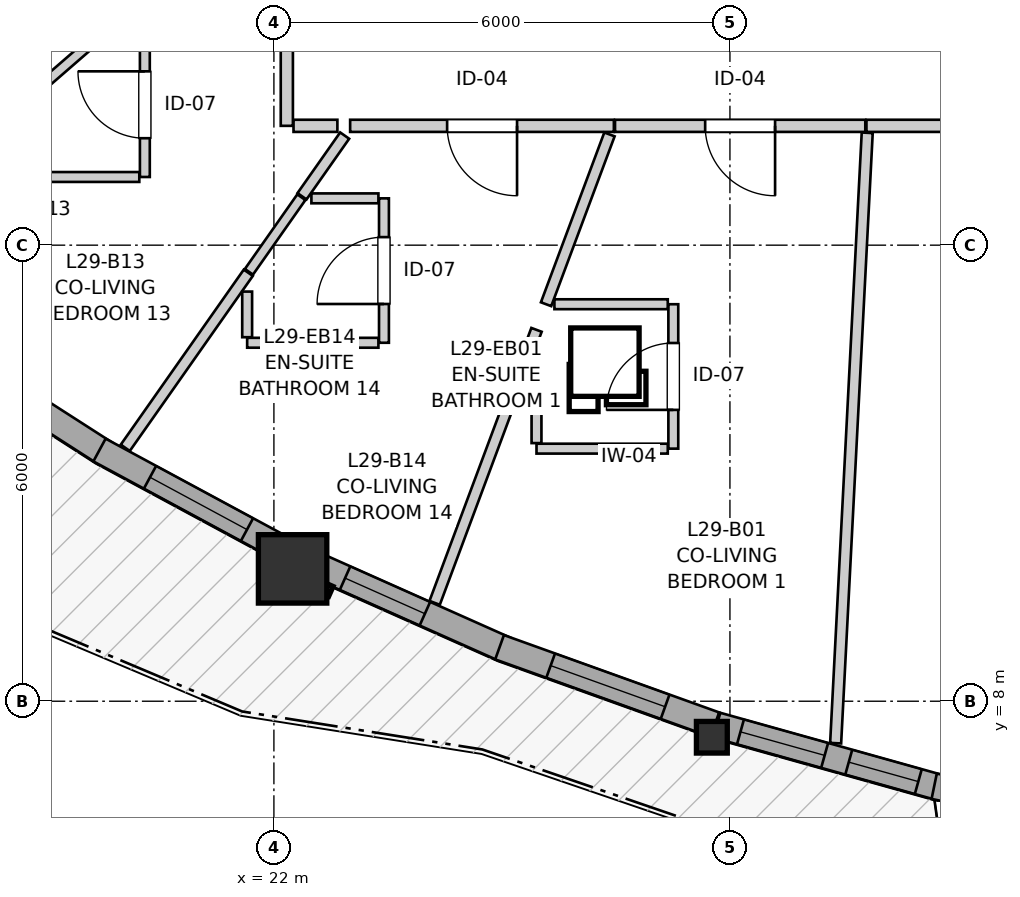
"""IFC4 building model, lengths in metres.
Left out: names, types, materials, properties, quantities, classifications, styles, units other than length and angle.
Written with IfcOpenShell. Run it as: python <this file> out.ifc"""

import sys

from ifc_helpers import new_model, si_unit, direction, frame, frame_2d, origin, origin_2d, place, context, subcontext, project, spatial, rectangle, i_section, extrude, source, transform, mapped, element, fill, save


model = new_model("IFC4")
c1 = context("Model", 3, precision=1e-05, world=origin(), true_north=direction((0.0, 1.0)))
c2 = subcontext(c1, "Body", "Model", "MODEL_VIEW")
j1 = project(units=[si_unit("LENGTHUNIT", "METRE"), si_unit("PLANEANGLEUNIT", "RADIAN")], contexts=[c1])
p1 = place(None, origin())
s1 = spatial("IfcSite", under=j1, at=p1, CompositionType="ELEMENT")
p2 = place(p1, origin())
s2 = spatial("IfcBuilding", under=s1, at=p2, CompositionType="ELEMENT")
p3 = place(p2, frame((0.0, 0.0, 99.2)))
s3 = spatial("IfcBuildingStorey", under=s2, at=p3, CompositionType="ELEMENT", Elevation=99.2)
m1 = source(origin(), c2, "Body", "SweptSolid", [
    extrude(rectangle(XDim=0.9, YDim=0.9, at=origin_2d()), origin(), (0.0, 0.0, 1.0), 2.95),
])
p4 = place(p3, frame((22.246, 9.741, 0.0), z_axis=(0.0, 0.0, 1.0), x_axis=(1.0, 0.0, 0.0)))
e1 = element("IfcColumn", 1, at=p4, inside=s3, PredefinedType="COLUMN", context=c2, shape_type="MappedRepresentation", body=[
    mapped(m1, transform((0.0, 0.0, 0.0), x_axis=(1.0, 0.0, 0.0), y_axis=(0.0, 1.0, 0.0), z_axis=(0.0, 0.0, 1.0), scale=1.0)),
])
m2 = source(origin(), c2, "Body", "SweptSolid", [
    extrude(i_section(OverallWidth=0.406, OverallDepth=0.416, WebThickness=0.027, FlangeThickness=0.044, FilletRadius=0.015, at=origin_2d()), origin(), (0.0, 0.0, 1.0), 2.95),
])
p5 = place(p3, frame((27.762, 7.526, 0.0), z_axis=(0.0, 0.0, 1.0), x_axis=(1.0, 0.0, 0.0)))
e2 = element("IfcColumn", 2, at=p5, inside=s3, PredefinedType="PILASTER", context=c2, shape_type="MappedRepresentation", body=[
    mapped(m2, transform((0.0, 0.0, 0.0), x_axis=(1.0, 0.0, 0.0), y_axis=(0.0, 1.0, 0.0), z_axis=(0.0, 0.0, 1.0), scale=1.0)),
])
p6 = place(p3, frame((17.292, 12.858, 0.0), z_axis=(0.0, 0.0, 1.0), x_axis=(0.841524200167, -0.540219418878, 0.0)))
e3 = element("IfcWall", 3, at=p6, inside=s3, PredefinedType="SOLIDWALL", context=c2, shape_type="SweptSolid", body=[
    extrude(rectangle(XDim=2.958, YDim=0.34, at=frame_2d((1.479, 0.0))), origin(), (0.0, 0.0, 1.0), 2.48),
])
p7 = place(p6, frame((0.944, 0.0, 0.82)))
e4 = element("IfcOpeningElement", 4, at=p7, cuts=e3, PredefinedType="OPENING", context=c2, shape_type="SweptSolid", body=[
    extrude(rectangle(XDim=1.05, YDim=1.45, at=frame_2d((0.525, 0.725))), frame((0.0, 0.18, 0.0), z_axis=(0.0, -1.0, 0.0), x_axis=(1.0, 0.0, 0.0)), (0.0, 0.0, 1.0), 0.36),
])
p8 = place(p3, frame((19.705, 11.305, 0.0), z_axis=(0.0, 0.0, 1.0), x_axis=(0.880065774925, -0.474851799834, 0.0)))
e5 = element("IfcWall", 5, at=p8, inside=s3, PredefinedType="SOLIDWALL", context=c2, shape_type="SweptSolid", body=[
    extrude(rectangle(XDim=2.749, YDim=0.34, at=frame_2d((1.374, 0.0))), origin(), (0.0, 0.0, 1.0), 2.48),
])
p9 = place(p8, frame((0.755, 0.0, 0.82)))
e6 = element("IfcOpeningElement", 6, at=p9, cuts=e5, PredefinedType="OPENING", context=c2, shape_type="SweptSolid", body=[
    extrude(rectangle(XDim=1.45, YDim=1.25, at=frame_2d((0.725, 0.625))), frame((0.0, 0.18, 0.0), z_axis=(0.0, -1.0, 0.0), x_axis=(1.0, 0.0, 0.0)), (0.0, 0.0, 1.0), 0.36),
])
p10 = place(p3, frame((22.525, 9.803, 0.0), z_axis=(0.0, 0.0, 1.0), x_axis=(0.913407022137, -0.407047432016, 0.0)))
e7 = element("IfcWall", 7, at=p10, inside=s3, PredefinedType="SOLIDWALL", context=c2, shape_type="SweptSolid", body=[
    extrude(rectangle(XDim=2.766, YDim=0.34, at=frame_2d((1.383, 0.0))), origin(), (0.0, 0.0, 1.0), 2.48),
])
p11 = place(p10, frame((0.45, 0.0, 0.82)))
e8 = element("IfcOpeningElement", 8, at=p11, cuts=e7, PredefinedType="OPENING", context=c2, shape_type="SweptSolid", body=[
    extrude(rectangle(XDim=1.15, YDim=1.2, at=frame_2d((0.575, 0.6))), frame((0.0, 0.18, 0.0), z_axis=(0.0, -1.0, 0.0), x_axis=(1.0, 0.0, 0.0)), (0.0, 0.0, 1.0), 0.36),
])
p12 = place(p3, frame((24.969, 8.71, 0.0), z_axis=(0.0, 0.0, 1.0), x_axis=(0.94111062187, -0.338098798287, 0.0)))
e9 = element("IfcWall", 9, at=p12, inside=s3, PredefinedType="SOLIDWALL", context=c2, shape_type="SweptSolid", body=[
    extrude(rectangle(XDim=3.009, YDim=0.34, at=frame_2d((1.504, 0.0))), origin(), (0.0, 0.0, 1.0), 2.48),
])
p13 = place(p12, frame((0.714, 0.0, 0.82)))
e10 = element("IfcOpeningElement", 10, at=p13, cuts=e9, PredefinedType="OPENING", context=c2, shape_type="SweptSolid", body=[
    extrude(rectangle(XDim=1.6, YDim=1.35, at=frame_2d((0.8, 0.675))), frame((0.0, 0.18, 0.0), z_axis=(0.0, -1.0, 0.0), x_axis=(1.0, 0.0, 0.0)), (0.0, 0.0, 1.0), 0.36),
])
p14 = place(p3, frame((27.827, 7.684, 0.0), z_axis=(0.0, 0.0, 1.0), x_axis=(0.963051015651, -0.269319032475, 0.0)))
e11 = element("IfcWall", 11, at=p14, inside=s3, PredefinedType="SOLIDWALL", context=c2, shape_type="SweptSolid", body=[
    extrude(rectangle(XDim=3.059, YDim=0.34, at=frame_2d((1.529, 0.0))), origin(), (0.0, 0.0, 1.0), 2.48),
])
p15 = place(p14, frame((0.323, 0.0, 0.82)))
e12 = element("IfcOpeningElement", 12, at=p15, cuts=e11, PredefinedType="OPENING", context=c2, shape_type="SweptSolid", body=[
    extrude(rectangle(XDim=1.15, YDim=1.2, at=frame_2d((0.575, 0.6))), frame((0.0, 0.18, 0.0), z_axis=(0.0, -1.0, 0.0), x_axis=(1.0, 0.0, 0.0)), (0.0, 0.0, 1.0), 0.36),
])
p16 = place(p14, frame((1.803, 0.0, 0.82)))
e13 = element("IfcOpeningElement", 13, at=p16, cuts=e11, PredefinedType="OPENING", context=c2, shape_type="SweptSolid", body=[
    extrude(rectangle(XDim=0.95, YDim=1.35, at=frame_2d((0.475, 0.675))), frame((0.0, 0.18, 0.0), z_axis=(0.0, -1.0, 0.0), x_axis=(1.0, 0.0, 0.0)), (0.0, 0.0, 1.0), 0.36),
])
p17 = place(p3, frame((30.687, 6.881, 0.0), z_axis=(0.0, 0.0, 1.0), x_axis=(0.979429773913, -0.201785326453, 0.0)))
e14 = element("IfcWall", 14, at=p17, inside=s3, PredefinedType="SOLIDWALL", context=c2, shape_type="SweptSolid", body=[
    extrude(rectangle(XDim=2.913, YDim=0.34, at=frame_2d((1.457, 0.0))), origin(), (0.0, 0.0, 1.0), 2.48),
])
p18 = place(p17, frame((0.837, 0.0, 0.82)))
e15 = element("IfcOpeningElement", 15, at=p18, cuts=e14, PredefinedType="OPENING", context=c2, shape_type="SweptSolid", body=[
    extrude(rectangle(XDim=1.25, YDim=1.35, at=frame_2d((0.625, 0.675))), frame((0.0, 0.18, 0.0), z_axis=(0.0, -1.0, 0.0), x_axis=(1.0, 0.0, 0.0)), (0.0, 0.0, 1.0), 0.36),
])
p19 = place(p3, frame((34.373, 15.57, 0.0), z_axis=(0.0, 0.0, 1.0), x_axis=(-1.0, 0.0, 0.0)))
e16 = element("IfcWall", 16, at=p19, inside=s3, PredefinedType="PARTITIONING", context=c2, shape_type="SweptSolid", body=[
    extrude(rectangle(XDim=4.577, YDim=0.16, at=frame_2d((2.289, 0.0))), origin(), (0.0, 0.0, 1.0), 2.95),
])
p20 = place(p19, frame((1.639, 0.0, 0.0)))
e17 = element("IfcOpeningElement", 17, at=p20, cuts=e16, PredefinedType="OPENING", context=c2, shape_type="SweptSolid", body=[
    extrude(rectangle(XDim=1.3, YDim=2.1, at=frame_2d((0.65, 1.05))), frame((0.0, 0.09, 0.0), z_axis=(0.0, -1.0, 0.0), x_axis=(1.0, 0.0, 0.0)), (0.0, 0.0, 1.0), 0.18),
])
p21 = place(p3, frame((26.473, 15.57, 0.0), z_axis=(0.0, 0.0, 1.0), x_axis=(-1.0, 0.0, 0.0)))
e18 = element("IfcWall", 18, at=p21, inside=s3, PredefinedType="PARTITIONING", context=c2, shape_type="SweptSolid", body=[
    extrude(rectangle(XDim=3.47, YDim=0.16, at=frame_2d((1.735, 0.0))), origin(), (0.0, 0.0, 1.0), 2.95),
])
p22 = place(p21, frame((1.274, 0.0, 0.0)))
e19 = element("IfcOpeningElement", 19, at=p22, cuts=e18, PredefinedType="OPENING", context=c2, shape_type="SweptSolid", body=[
    extrude(rectangle(XDim=0.92, YDim=2.1, at=frame_2d((0.46, 1.05))), frame((0.0, 0.09, 0.0), z_axis=(0.0, -1.0, 0.0), x_axis=(1.0, 0.0, 0.0)), (0.0, 0.0, 1.0), 0.18),
])
p23 = place(p3, frame((22.17, 15.57, 0.0), z_axis=(0.0, 0.0, 1.0), x_axis=(0.0, 1.0, 0.0)))
e20 = element("IfcWall", 20, at=p23, inside=s3, PredefinedType="PARTITIONING", context=c2, shape_type="SweptSolid", body=[
    extrude(rectangle(XDim=3.346, YDim=0.16, at=frame_2d((1.673, 0.0))), origin(), (0.0, 0.0, 1.0), 2.95),
])
p24 = place(p23, frame((1.203, 0.0, 0.0)))
e21 = element("IfcOpeningElement", 21, at=p24, cuts=e20, PredefinedType="OPENING", context=c2, shape_type="SweptSolid", body=[
    extrude(rectangle(XDim=0.92, YDim=2.1, at=frame_2d((0.46, 1.05))), frame((0.0, 0.09, 0.0), z_axis=(0.0, -1.0, 0.0), x_axis=(1.0, 0.0, 0.0)), (0.0, 0.0, 1.0), 0.18),
])
p25 = place(p3, frame((29.781, 15.57, 0.0), z_axis=(0.0, 0.0, 1.0), x_axis=(-1.0, 0.0, 0.0)))
e22 = element("IfcWall", 22, at=p25, inside=s3, PredefinedType="PARTITIONING", context=c2, shape_type="SweptSolid", body=[
    extrude(rectangle(XDim=3.293, YDim=0.16, at=frame_2d((1.646, 0.0))), origin(), (0.0, 0.0, 1.0), 2.95),
])
p26 = place(p25, frame((1.187, 0.0, 0.0)))
e23 = element("IfcOpeningElement", 23, at=p26, cuts=e22, PredefinedType="OPENING", context=c2, shape_type="SweptSolid", body=[
    extrude(rectangle(XDim=0.92, YDim=2.1, at=frame_2d((0.46, 1.05))), frame((0.0, 0.09, 0.0), z_axis=(0.0, -1.0, 0.0), x_axis=(1.0, 0.0, 0.0)), (0.0, 0.0, 1.0), 0.18),
])
p27 = place(p3, frame((27.255, 11.323, 0.0), z_axis=(0.0, 0.0, 1.0), x_axis=(0.0, 1.0, 0.0)))
e24 = element("IfcWall", 24, at=p27, inside=s3, PredefinedType="PARTITIONING", context=c2, shape_type="SweptSolid", body=[
    extrude(rectangle(XDim=1.9, YDim=0.13, at=frame_2d((0.95, 0.0))), origin(), (0.0, 0.0, 1.0), 2.95),
])
p28 = place(p27, frame((0.51, 0.0, 0.0)))
e25 = element("IfcOpeningElement", 25, at=p28, cuts=e24, PredefinedType="OPENING", context=c2, shape_type="SweptSolid", body=[
    extrude(rectangle(XDim=0.88, YDim=2.05, at=frame_2d((0.44, 1.025))), frame((0.0, 0.075, 0.0), z_axis=(0.0, -1.0, 0.0), x_axis=(1.0, 0.0, 0.0)), (0.0, 0.0, 1.0), 0.15),
])
p29 = place(p3, frame((20.302, 14.897, 0.0), z_axis=(0.0, 0.0, 1.0), x_axis=(0.0, 1.0, 0.0)))
e26 = element("IfcWall", 26, at=p29, inside=s3, PredefinedType="PARTITIONING", context=c2, shape_type="SweptSolid", body=[
    extrude(rectangle(XDim=1.9, YDim=0.13, at=frame_2d((0.95, 0.0))), origin(), (0.0, 0.0, 1.0), 2.95),
])
p30 = place(p29, frame((0.51, 0.0, 0.0)))
e27 = element("IfcOpeningElement", 27, at=p30, cuts=e26, PredefinedType="OPENING", context=c2, shape_type="SweptSolid", body=[
    extrude(rectangle(XDim=0.88, YDim=2.05, at=frame_2d((0.44, 1.025))), frame((0.0, 0.075, 0.0), z_axis=(0.0, -1.0, 0.0), x_axis=(1.0, 0.0, 0.0)), (0.0, 0.0, 1.0), 0.15),
])
p31 = place(p3, frame((23.448, 12.716, 0.0), z_axis=(0.0, 0.0, 1.0), x_axis=(0.0, 1.0, 0.0)))
e28 = element("IfcWall", 28, at=p31, inside=s3, PredefinedType="PARTITIONING", context=c2, shape_type="SweptSolid", body=[
    extrude(rectangle(XDim=1.9, YDim=0.13, at=frame_2d((0.95, 0.0))), origin(), (0.0, 0.0, 1.0), 2.95),
])
p32 = place(p31, frame((0.51, 0.0, 0.0)))
e29 = element("IfcOpeningElement", 29, at=p32, cuts=e28, PredefinedType="OPENING", context=c2, shape_type="SweptSolid", body=[
    extrude(rectangle(XDim=0.88, YDim=2.05, at=frame_2d((0.44, 1.025))), frame((0.0, 0.075, 0.0), z_axis=(0.0, -1.0, 0.0), x_axis=(1.0, 0.0, 0.0)), (0.0, 0.0, 1.0), 0.15),
])
p33 = place(p3, frame((13.622, 16.028, 0.0), z_axis=(0.0, 0.0, 1.0), x_axis=(0.85896108151, 0.512040877716, 0.0)))
e30 = element("IfcWall", 30, at=p33, inside=s3, PredefinedType="PARTITIONING", context=c2, shape_type="SweptSolid", body=[
    extrude(rectangle(XDim=9.807, YDim=0.145, at=frame_2d((4.904, 0.0))), origin(), (0.0, 0.0, 1.0), 2.95),
])
p34 = place(p3, frame((29.391, 7.448, 0.0), z_axis=(0.0, 0.0, 1.0), x_axis=(0.051677535725, 0.998663823467, 0.0)))
e31 = element("IfcWall", 31, at=p34, inside=s3, PredefinedType="PARTITIONING", context=c2, shape_type="SweptSolid", body=[
    extrude(rectangle(XDim=8.041, YDim=0.145, at=frame_2d((4.021, 0.0))), origin(), (0.0, 0.0, 1.0), 2.95),
])
p35 = place(p3, frame((24.115, 9.294, 0.0), z_axis=(0.0, 0.0, 1.0), x_axis=(0.349559649022, 0.936914111205, 0.0)))
e32 = element("IfcWall", 32, at=p35, inside=s3, PredefinedType="PARTITIONING", context=c2, shape_type="SweptSolid", body=[
    extrude(rectangle(XDim=3.834, YDim=0.145, at=frame_2d((1.917, 0.0))), origin(), (0.0, 0.0, 1.0), 2.95),
])
p36 = place(p3, frame((20.044, 11.334, 0.0), z_axis=(0.0, 0.0, 1.0), x_axis=(0.575027113175, 0.818134352728, 0.0)))
e33 = element("IfcWall", 33, at=p36, inside=s3, PredefinedType="PARTITIONING", context=c2, shape_type="SweptSolid", body=[
    extrude(rectangle(XDim=2.815, YDim=0.145, at=frame_2d((1.407, 0.0))), origin(), (0.0, 0.0, 1.0), 2.95),
])
p37 = place(p3, frame((25.581, 13.223, 0.0), z_axis=(0.0, 0.0, 1.0), x_axis=(0.349597225683, 0.936900090615, 0.0)))
e34 = element("IfcWall", 34, at=p37, inside=s3, PredefinedType="PARTITIONING", context=c2, shape_type="SweptSolid", body=[
    extrude(rectangle(XDim=2.385, YDim=0.145, at=frame_2d((1.192, 0.0))), origin(), (0.0, 0.0, 1.0), 2.95),
])
p38 = place(p3, frame((25.455, 11.323, 0.0), z_axis=(0.0, 0.0, 1.0), x_axis=(1.0, 0.0, 0.0)))
e35 = element("IfcWall", 35, at=p38, inside=s3, PredefinedType="PARTITIONING", context=c2, shape_type="SweptSolid", body=[
    extrude(rectangle(XDim=1.727, YDim=0.13, at=frame_2d((0.863, 0.0))), origin(), (0.0, 0.0, 1.0), 2.558),
])
for number, where, z_axis, x_axis in (
    (36, (18.502, 14.897, 0.0), (0.0, 0.0, 1.0), (1.0, 0.0, 0.0)),
    (37, (21.648, 12.716, 0.0), (0.0, 0.0, 1.0), (1.0, 0.0, 0.0)),
):
    element("IfcWall", number, at=place(p3, frame(where, z_axis=z_axis, x_axis=x_axis)), inside=s3, PredefinedType="PARTITIONING", context=c2, shape_type="SweptSolid", body=[
        extrude(rectangle(XDim=1.727, YDim=0.13, at=frame_2d((0.864, 0.0))), origin(), (0.0, 0.0, 1.0), 2.95),
    ])
p39 = place(p3, frame((25.691, 13.223, 0.0), z_axis=(0.0, 0.0, 1.0), x_axis=(1.0, 0.0, 0.0)))
e38 = element("IfcWall", 38, at=p39, inside=s3, PredefinedType="PARTITIONING", context=c2, shape_type="SweptSolid", body=[
    extrude(rectangle(XDim=1.491, YDim=0.13, at=frame_2d((0.746, 0.0))), origin(), (0.0, 0.0, 1.0), 2.95),
])
p40 = place(p3, frame((18.528, 15.734, 0.0), z_axis=(0.0, 0.0, 1.0), x_axis=(0.755063236967, 0.655651971843, 0.0)))
e39 = element("IfcWall", 39, at=p40, inside=s3, PredefinedType="PARTITIONING", context=c2, shape_type="SweptSolid", body=[
    extrude(rectangle(XDim=1.584, YDim=0.13, at=frame_2d((0.792, 0.0))), origin(), (0.0, 0.0, 1.0), 2.95),
])
p41 = place(p3, frame((25.455, 11.396, 0.0), z_axis=(0.0, 0.0, 1.0), x_axis=(0.0, 1.0, 0.0)))
e40 = element("IfcWall", 40, at=p41, inside=s3, PredefinedType="PARTITIONING", context=c2, shape_type="SweptSolid", body=[
    extrude(rectangle(XDim=1.25, YDim=0.13, at=frame_2d((0.625, 0.0))), origin(), (0.0, 0.0, 1.0), 2.95),
])
p42 = place(p3, frame((21.671, 13.649, 0.0), z_axis=(0.0, 0.0, 1.0), x_axis=(0.574868196693, 0.81824602439, 0.0)))
e41 = element("IfcWall", 41, at=p42, inside=s3, PredefinedType="PARTITIONING", context=c2, shape_type="SweptSolid", body=[
    extrude(rectangle(XDim=1.2, YDim=0.13, at=frame_2d((0.6, 0.0))), origin(), (0.0, 0.0, 1.0), 2.95),
])
p43 = place(p3, frame((22.37, 14.643, 0.0), z_axis=(0.0, 0.0, 1.0), x_axis=(0.575022445487, 0.818137633401, 0.0)))
e42 = element("IfcWall", 42, at=p43, inside=s3, PredefinedType="PARTITIONING", context=c2, shape_type="SweptSolid", body=[
    extrude(rectangle(XDim=0.976, YDim=0.145, at=frame_2d((0.488, 0.0))), origin(), (0.0, 0.0, 1.0), 2.95),
])
p44 = place(p3, frame((22.493, 14.616, 0.0), z_axis=(0.0, 0.0, 1.0), x_axis=(1.0, 0.0, 0.0)))
e43 = element("IfcWall", 43, at=p44, inside=s3, PredefinedType="PARTITIONING", context=c2, shape_type="SweptSolid", body=[
    extrude(rectangle(XDim=0.882, YDim=0.13, at=frame_2d((0.441, 0.0))), origin(), (0.0, 0.0, 1.0), 2.95),
])
p45 = place(p3, frame((21.648, 12.789, 0.0), z_axis=(0.0, 0.0, 1.0), x_axis=(0.0, 1.0, 0.0)))
e44 = element("IfcWall", 44, at=p45, inside=s3, PredefinedType="PARTITIONING", context=c2, shape_type="SweptSolid", body=[
    extrude(rectangle(XDim=0.6, YDim=0.13, at=frame_2d((0.3, 0.0))), origin(), (0.0, 0.0, 1.0), 2.95),
])
p46 = place(p3, frame((22.258, 15.57, 0.0), z_axis=(0.0, 0.0, 1.0), x_axis=(1.0, 0.0, 0.0)))
e45 = element("IfcWall", 45, at=p46, inside=s3, PredefinedType="PARTITIONING", context=c2, shape_type="SweptSolid", body=[
    extrude(rectangle(XDim=0.577, YDim=0.16, at=frame_2d((0.289, 0.0))), origin(), (0.0, 0.0, 1.0), 2.95),
])
m3 = source(origin(), c2, "Body", "SweptSolid", [
    extrude(rectangle(XDim=1.45, YDim=1.25, at=frame_2d((0.725, 0.625))), frame((0.0, 0.03, 0.0), z_axis=(0.0, -1.0, 0.0), x_axis=(1.0, 0.0, 0.0)), (0.0, 0.0, 1.0), 0.06),
])
p47 = place(p9, origin())
e46 = element("IfcWindow", 46, at=p47, inside=s3, PartitioningType="SINGLE_PANEL", PredefinedType="WINDOW", context=c2, shape_type="MappedRepresentation", body=[
    mapped(m3, transform((0.0, 0.0, 0.0), x_axis=(1.0, 0.0, 0.0), y_axis=(0.0, 1.0, 0.0), z_axis=(0.0, 0.0, 1.0), scale=1.0)),
])
fill(e6, e46)
m4 = source(origin(), c2, "Body", "SweptSolid", [
    extrude(rectangle(XDim=1.15, YDim=1.2, at=frame_2d((0.575, 0.6))), frame((0.0, 0.03, 0.0), z_axis=(0.0, -1.0, 0.0), x_axis=(1.0, 0.0, 0.0)), (0.0, 0.0, 1.0), 0.06),
])
p48 = place(p11, origin())
e47 = element("IfcWindow", 47, at=p48, inside=s3, PartitioningType="SINGLE_PANEL", PredefinedType="WINDOW", context=c2, shape_type="MappedRepresentation", body=[
    mapped(m4, transform((0.0, 0.0, 0.0), x_axis=(1.0, 0.0, 0.0), y_axis=(0.0, 1.0, 0.0), z_axis=(0.0, 0.0, 1.0), scale=1.0)),
])
fill(e8, e47)
m5 = source(origin(), c2, "Body", "SweptSolid", [
    extrude(rectangle(XDim=1.6, YDim=1.35, at=frame_2d((0.8, 0.675))), frame((0.0, 0.03, 0.0), z_axis=(0.0, -1.0, 0.0), x_axis=(1.0, 0.0, 0.0)), (0.0, 0.0, 1.0), 0.06),
])
p49 = place(p13, origin())
e48 = element("IfcWindow", 48, at=p49, inside=s3, PartitioningType="SINGLE_PANEL", PredefinedType="WINDOW", context=c2, shape_type="MappedRepresentation", body=[
    mapped(m5, transform((0.0, 0.0, 0.0), x_axis=(1.0, 0.0, 0.0), y_axis=(0.0, 1.0, 0.0), z_axis=(0.0, 0.0, 1.0), scale=1.0)),
])
fill(e10, e48)
p50 = place(p15, origin())
e49 = element("IfcWindow", 49, at=p50, inside=s3, PartitioningType="SINGLE_PANEL", PredefinedType="WINDOW", context=c2, shape_type="MappedRepresentation", body=[
    mapped(m4, transform((0.0, 0.0, 0.0), x_axis=(1.0, 0.0, 0.0), y_axis=(0.0, 1.0, 0.0), z_axis=(0.0, 0.0, 1.0), scale=1.0)),
])
fill(e12, e49)
m6 = source(origin(), c2, "Body", "SweptSolid", [
    extrude(rectangle(XDim=0.95, YDim=1.35, at=frame_2d((0.475, 0.675))), frame((0.0, 0.03, 0.0), z_axis=(0.0, -1.0, 0.0), x_axis=(1.0, 0.0, 0.0)), (0.0, 0.0, 1.0), 0.06),
])
p51 = place(p16, origin())
e50 = element("IfcWindow", 50, at=p51, inside=s3, PartitioningType="SINGLE_PANEL", PredefinedType="WINDOW", context=c2, shape_type="MappedRepresentation", body=[
    mapped(m6, transform((0.0, 0.0, 0.0), x_axis=(1.0, 0.0, 0.0), y_axis=(0.0, 1.0, 0.0), z_axis=(0.0, 0.0, 1.0), scale=1.0)),
])
fill(e13, e50)
m7 = source(origin(), c2, "Body", "SweptSolid", [
    extrude(rectangle(XDim=0.92, YDim=2.1, at=frame_2d((0.46, 1.05))), frame((0.0, 0.025, 0.0), z_axis=(0.0, -1.0, 0.0), x_axis=(1.0, 0.0, 0.0)), (0.0, 0.0, 1.0), 0.05),
])
p52 = place(p22, origin())
e51 = element("IfcDoor", 51, at=p52, inside=s3, OperationType="SINGLE_SWING_LEFT", PredefinedType="DOOR", context=c2, shape_type="MappedRepresentation", body=[
    mapped(m7, transform((0.0, 0.0, 0.0), x_axis=(1.0, 0.0, 0.0), y_axis=(0.0, 1.0, 0.0), z_axis=(0.0, 0.0, 1.0), scale=1.0)),
])
fill(e19, e51)
p53 = place(p26, origin())
e52 = element("IfcDoor", 52, at=p53, inside=s3, OperationType="SINGLE_SWING_LEFT", PredefinedType="DOOR", context=c2, shape_type="MappedRepresentation", body=[
    mapped(m7, transform((0.0, 0.0, 0.0), x_axis=(1.0, 0.0, 0.0), y_axis=(0.0, 1.0, 0.0), z_axis=(0.0, 0.0, 1.0), scale=1.0)),
])
fill(e23, e52)
m8 = source(origin(), c2, "Body", "SweptSolid", [
    extrude(rectangle(XDim=0.88, YDim=2.05, at=frame_2d((0.44, 1.025))), frame((0.0, 0.025, 0.0), z_axis=(0.0, -1.0, 0.0), x_axis=(1.0, 0.0, 0.0)), (0.0, 0.0, 1.0), 0.05),
])
p54 = place(p28, origin())
e53 = element("IfcDoor", 53, at=p54, inside=s3, OperationType="SINGLE_SWING_LEFT", PredefinedType="DOOR", context=c2, shape_type="MappedRepresentation", body=[
    mapped(m8, transform((0.0, 0.0, 0.0), x_axis=(1.0, 0.0, 0.0), y_axis=(0.0, 1.0, 0.0), z_axis=(0.0, 0.0, 1.0), scale=1.0)),
])
fill(e25, e53)
p55 = place(p30, origin())
e54 = element("IfcDoor", 54, at=p55, inside=s3, OperationType="SINGLE_SWING_RIGHT", PredefinedType="DOOR", context=c2, shape_type="MappedRepresentation", body=[
    mapped(m8, transform((0.0, 0.0, 0.0), x_axis=(1.0, 0.0, 0.0), y_axis=(0.0, 1.0, 0.0), z_axis=(0.0, 0.0, 1.0), scale=1.0)),
])
fill(e27, e54)
p56 = place(p32, origin())
e55 = element("IfcDoor", 55, at=p56, inside=s3, OperationType="SINGLE_SWING_LEFT", PredefinedType="DOOR", context=c2, shape_type="MappedRepresentation", body=[
    mapped(m8, transform((0.0, 0.0, 0.0), x_axis=(1.0, 0.0, 0.0), y_axis=(0.0, 1.0, 0.0), z_axis=(0.0, 0.0, 1.0), scale=1.0)),
])
fill(e29, e55)
save(model, sys.argv[1])
